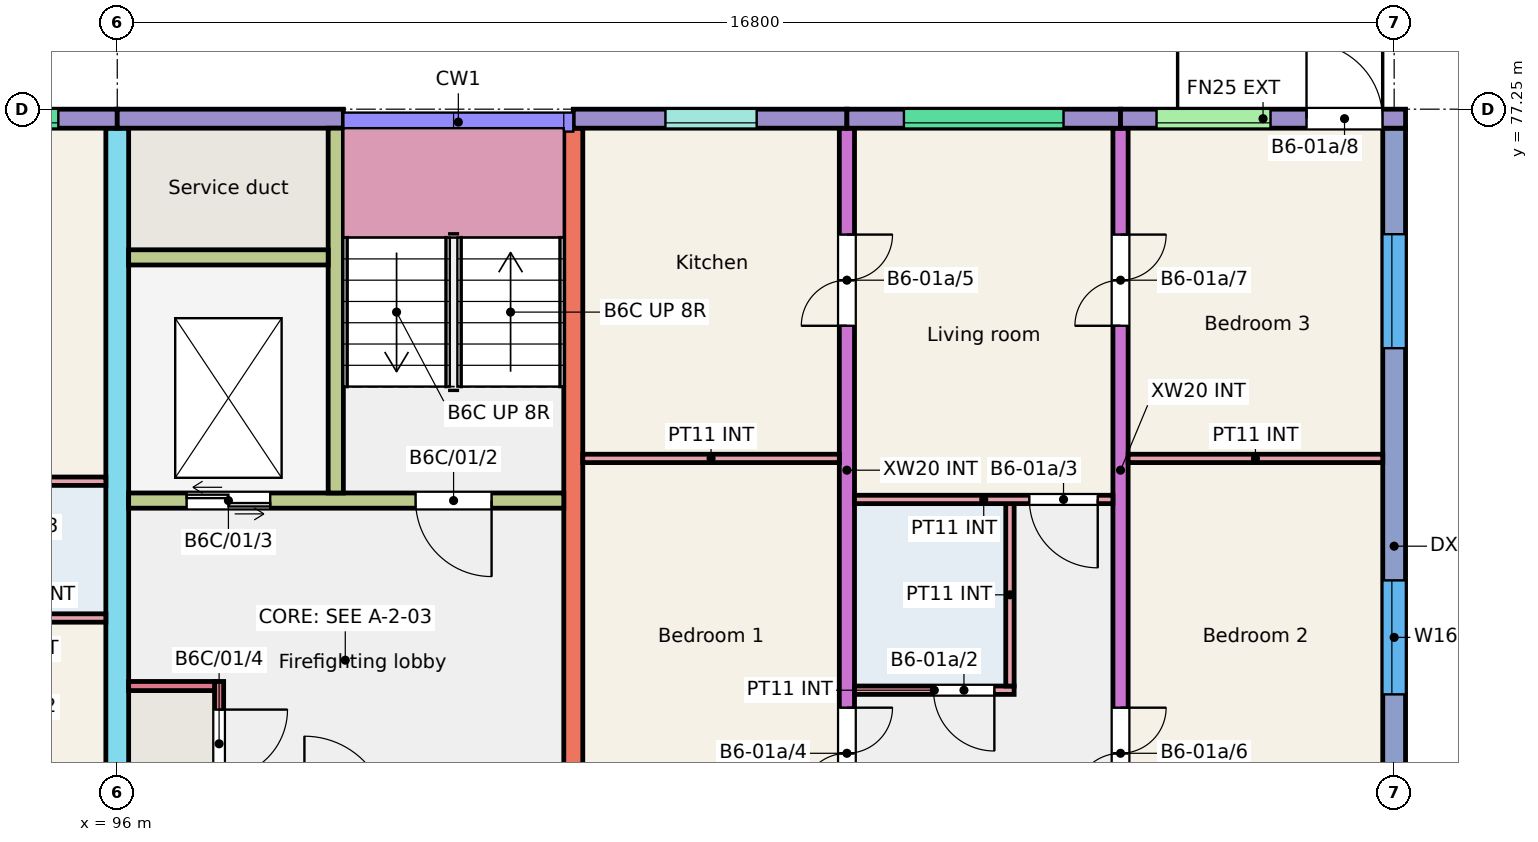
"""IFC4 building model, lengths in metres.
Left out: names, types, materials, properties, quantities, classifications, styles, units other than length and angle.
Written with IfcOpenShell. Run it as: python <this file> out.ifc"""

import sys

from ifc_helpers import new_model, si_unit, direction, frame, frame_2d, origin, place, context, subcontext, project, spatial, rectangle, extrude, element, fill, save


model = new_model("IFC4")
c1 = context("Model", 3, precision=1e-05, world=origin(), true_north=direction((0.0, 1.0)))
c2 = subcontext(c1, "Body", "Model", "MODEL_VIEW")
j1 = project(units=[si_unit("LENGTHUNIT", "METRE"), si_unit("PLANEANGLEUNIT", "RADIAN")], contexts=[c1])
p1 = place(None, origin())
s1 = spatial("IfcSite", under=j1, at=p1, CompositionType="ELEMENT")
p2 = place(p1, origin())
s2 = spatial("IfcBuilding", under=s1, at=p2, CompositionType="ELEMENT")
p3 = place(p2, frame((0.0, 0.0, 3.0)))
s3 = spatial("IfcBuildingStorey", under=s2, at=p3, CompositionType="ELEMENT", Elevation=3.0)
p4 = place(p3, frame((96.0, 66.0, 0.0), z_axis=(0.0, 0.0, 1.0), x_axis=(0.0, 1.0, 0.0)))
e1 = element("IfcWall", 1, at=p4, inside=s3, PredefinedType="SHEAR", context=c2, shape_type="SweptSolid", body=[
    extrude(rectangle(XDim=11.0, YDim=0.3, at=frame_2d((5.5, 0.0))), origin(), (0.0, 0.0, 1.0), 3.0),
])
p5 = place(p4, frame((0.3, 0.0, 0.0)))
e2 = element("IfcOpeningElement", 2, at=p5, cuts=e1, PredefinedType="OPENING", context=c2, shape_type="SweptSolid", body=[
    extrude(rectangle(XDim=1.2, YDim=2.1, at=frame_2d((0.6, 1.05))), frame((0.0, 0.16, 0.0), z_axis=(0.0, -1.0, 0.0), x_axis=(1.0, 0.0, 0.0)), (0.0, 0.0, 1.0), 0.32),
])
p6 = place(p3, frame((102.0, 68.0, 0.0), z_axis=(0.0, 0.0, 1.0), x_axis=(0.0, 1.0, 0.0)))
e3 = element("IfcWall", 3, at=p6, inside=s3, PredefinedType="SHEAR", context=c2, shape_type="SweptSolid", body=[
    extrude(rectangle(XDim=9.0, YDim=0.25, at=frame_2d((4.5, 0.0))), origin(), (0.0, 0.0, 1.0), 3.0),
])
p7 = place(p3, frame((105.6, 68.0, 0.0), z_axis=(0.0, 0.0, 1.0), x_axis=(0.0, 1.0, 0.0)))
e4 = element("IfcWall", 4, at=p7, inside=s3, PredefinedType="SHEAR", context=c2, shape_type="SweptSolid", body=[
    extrude(rectangle(XDim=9.0, YDim=0.2, at=frame_2d((4.5, 0.0))), origin(), (0.0, 0.0, 1.0), 3.0),
])
p8 = place(p7, frame((0.175, 0.0, 0.0)))
e5 = element("IfcOpeningElement", 5, at=p8, cuts=e4, PredefinedType="OPENING", context=c2, shape_type="SweptSolid", body=[
    extrude(rectangle(XDim=1.2, YDim=2.1, at=frame_2d((0.6, 1.05))), frame((0.0, 0.11, 0.0), z_axis=(0.0, -1.0, 0.0), x_axis=(1.0, 0.0, 0.0)), (0.0, 0.0, 1.0), 0.22),
])
p9 = place(p7, frame((6.4, 0.0, 0.0)))
e6 = element("IfcOpeningElement", 6, at=p9, cuts=e4, PredefinedType="OPENING", context=c2, shape_type="SweptSolid", body=[
    extrude(rectangle(XDim=1.2, YDim=2.1, at=frame_2d((0.6, 1.05))), frame((0.0, 0.11, 0.0), z_axis=(0.0, -1.0, 0.0), x_axis=(1.0, 0.0, 0.0)), (0.0, 0.0, 1.0), 0.22),
])
p10 = place(p3, frame((109.2, 68.0, 0.0), z_axis=(0.0, 0.0, 1.0), x_axis=(0.0, 1.0, 0.0)))
e7 = element("IfcWall", 7, at=p10, inside=s3, PredefinedType="SHEAR", context=c2, shape_type="SweptSolid", body=[
    extrude(rectangle(XDim=9.0, YDim=0.2, at=frame_2d((4.5, 0.0))), origin(), (0.0, 0.0, 1.0), 3.0),
])
p11 = place(p10, frame((0.175, 0.0, 0.0)))
e8 = element("IfcOpeningElement", 8, at=p11, cuts=e7, PredefinedType="OPENING", context=c2, shape_type="SweptSolid", body=[
    extrude(rectangle(XDim=1.2, YDim=2.1, at=frame_2d((0.6, 1.05))), frame((0.0, 0.11, 0.0), z_axis=(0.0, -1.0, 0.0), x_axis=(1.0, 0.0, 0.0)), (0.0, 0.0, 1.0), 0.22),
])
p12 = place(p10, frame((6.4, 0.0, 0.0)))
e9 = element("IfcOpeningElement", 9, at=p12, cuts=e7, PredefinedType="OPENING", context=c2, shape_type="SweptSolid", body=[
    extrude(rectangle(XDim=1.2, YDim=2.1, at=frame_2d((0.6, 1.05))), frame((0.0, 0.11, 0.0), z_axis=(0.0, -1.0, 0.0), x_axis=(1.0, 0.0, 0.0)), (0.0, 0.0, 1.0), 0.22),
])
p13 = place(p3, frame((112.8, 66.0, 0.0), z_axis=(0.0, 0.0, 1.0), x_axis=(0.0, 1.0, 0.0)))
e10 = element("IfcWall", 10, at=p13, inside=s3, PredefinedType="SHEAR", context=c2, shape_type="SweptSolid", body=[
    extrude(rectangle(XDim=11.0, YDim=0.3, at=frame_2d((5.5, 0.0))), origin(), (0.0, 0.0, 1.0), 3.0),
])
p14 = place(p13, frame((3.55, 0.0, 0.9)))
e11 = element("IfcOpeningElement", 11, at=p14, cuts=e10, PredefinedType="OPENING", context=c2, shape_type="SweptSolid", body=[
    extrude(rectangle(XDim=1.5, YDim=1.5, at=frame_2d((0.75, 0.75))), frame((0.0, 0.16, 0.0), z_axis=(0.0, -1.0, 0.0), x_axis=(1.0, 0.0, 0.0)), (0.0, 0.0, 1.0), 0.32),
])
p15 = place(p13, frame((8.105, 0.0, 0.9)))
e12 = element("IfcOpeningElement", 12, at=p15, cuts=e10, PredefinedType="OPENING", context=c2, shape_type="SweptSolid", body=[
    extrude(rectangle(XDim=1.5, YDim=1.5, at=frame_2d((0.75, 0.75))), frame((0.0, 0.16, 0.0), z_axis=(0.0, -1.0, 0.0), x_axis=(1.0, 0.0, 0.0)), (0.0, 0.0, 1.0), 0.32),
])
p16 = place(p3, frame((92.4, 77.125, 0.0), z_axis=(0.0, 0.0, 1.0), x_axis=(1.0, 0.0, 0.0)))
e13 = element("IfcWall", 13, at=p16, inside=s3, PredefinedType="SOLIDWALL", context=c2, shape_type="SweptSolid", body=[
    extrude(rectangle(XDim=3.6, YDim=0.25, at=frame_2d((1.8, 0.0))), origin(), (0.0, 0.0, 1.0), 3.0),
])
p17 = place(p16, frame((0.725, 0.0, 1.2)))
e14 = element("IfcOpeningElement", 14, at=p17, cuts=e13, PredefinedType="OPENING", context=c2, shape_type="SweptSolid", body=[
    extrude(rectangle(XDim=2.1, YDim=1.2, at=frame_2d((1.05, 0.6))), frame((0.0, 0.135, 0.0), z_axis=(0.0, -1.0, 0.0), x_axis=(1.0, 0.0, 0.0)), (0.0, 0.0, 1.0), 0.27),
])
p18 = place(p3, frame((96.0, 77.125, 0.0), z_axis=(0.0, 0.0, 1.0), x_axis=(1.0, 0.0, 0.0)))
e15 = element("IfcWall", 15, at=p18, inside=s3, PredefinedType="SOLIDWALL", context=c2, shape_type="SweptSolid", body=[
    extrude(rectangle(XDim=2.975, YDim=0.25, at=frame_2d((1.488, 0.0))), origin(), (0.0, 0.0, 1.0), 3.0),
])
p19 = place(p3, frame((96.15, 72.1, 0.0), z_axis=(0.0, 0.0, 1.0), x_axis=(1.0, 0.0, 0.0)))
e16 = element("IfcWall", 16, at=p19, inside=s3, PredefinedType="SHEAR", context=c2, shape_type="SweptSolid", body=[
    extrude(rectangle(XDim=5.725, YDim=0.2, at=frame_2d((2.863, 0.0))), origin(), (0.0, 0.0, 1.0), 3.0),
])
p20 = place(p19, frame((3.775, 0.0, 0.0)))
e17 = element("IfcOpeningElement", 17, at=p20, cuts=e16, PredefinedType="OPENING", context=c2, shape_type="SweptSolid", body=[
    extrude(rectangle(XDim=1.0, YDim=2.1, at=frame_2d((0.5, 1.05))), frame((0.0, 0.11, 0.0), z_axis=(0.0, -1.0, 0.0), x_axis=(1.0, 0.0, 0.0)), (0.0, 0.0, 1.0), 0.22),
])
p21 = place(p19, frame((0.762, 0.0, 0.0)))
e18 = element("IfcOpeningElement", 18, at=p21, cuts=e16, PredefinedType="OPENING", context=c2, shape_type="SweptSolid", body=[
    extrude(rectangle(XDim=1.1, YDim=2.1, at=frame_2d((0.55, 1.05))), frame((0.0, 0.11, 0.0), z_axis=(0.0, -1.0, 0.0), x_axis=(1.0, 0.0, 0.0)), (0.0, 0.0, 1.0), 0.22),
])
p22 = place(p3, frame((98.875, 72.2, 0.0), z_axis=(0.0, 0.0, 1.0), x_axis=(0.0, 1.0, 0.0)))
e19 = element("IfcWall", 19, at=p22, inside=s3, PredefinedType="SHEAR", context=c2, shape_type="SweptSolid", body=[
    extrude(rectangle(XDim=4.8, YDim=0.2, at=frame_2d((2.4, 0.0))), origin(), (0.0, 0.0, 1.0), 3.0),
])
p23 = place(p3, frame((96.15, 75.3, 0.0), z_axis=(0.0, 0.0, 1.0), x_axis=(1.0, 0.0, 0.0)))
e20 = element("IfcWall", 20, at=p23, inside=s3, PredefinedType="SHEAR", context=c2, shape_type="SweptSolid", body=[
    extrude(rectangle(XDim=2.625, YDim=0.2, at=frame_2d((1.312, 0.0))), origin(), (0.0, 0.0, 1.0), 3.0),
])
p24 = place(p3, frame((97.34, 68.0, 0.0), z_axis=(0.0, 0.0, 1.0), x_axis=(0.0, 1.0, 0.0)))
e21 = element("IfcWall", 21, at=p24, inside=s3, PredefinedType="SHEAR", context=c2, shape_type="SweptSolid", body=[
    extrude(rectangle(XDim=1.72, YDim=0.12, at=frame_2d((0.86, 0.0))), origin(), (0.0, 0.0, 1.0), 3.0),
])
p25 = place(p24, frame((0.45, 0.0, 0.0)))
e22 = element("IfcOpeningElement", 22, at=p25, cuts=e21, PredefinedType="OPENING", context=c2, shape_type="SweptSolid", body=[
    extrude(rectangle(XDim=0.9, YDim=2.1, at=frame_2d((0.45, 1.05))), frame((0.0, 0.07, 0.0), z_axis=(0.0, -1.0, 0.0), x_axis=(1.0, 0.0, 0.0)), (0.0, 0.0, 1.0), 0.14),
])
p26 = place(p3, frame((96.15, 69.66, 0.0), z_axis=(0.0, 0.0, 1.0), x_axis=(1.0, 0.0, 0.0)))
e23 = element("IfcWall", 23, at=p26, inside=s3, PredefinedType="SHEAR", context=c2, shape_type="SweptSolid", body=[
    extrude(rectangle(XDim=1.13, YDim=0.12, at=frame_2d((0.565, 0.0))), origin(), (0.0, 0.0, 1.0), 3.0),
])
p27 = place(p3, frame((102.0, 77.125, 0.0), z_axis=(0.0, 0.0, 1.0), x_axis=(1.0, 0.0, 0.0)))
e24 = element("IfcWall", 24, at=p27, inside=s3, PredefinedType="SOLIDWALL", context=c2, shape_type="SweptSolid", body=[
    extrude(rectangle(XDim=3.6, YDim=0.25, at=frame_2d((1.8, 0.0))), origin(), (0.0, 0.0, 1.0), 3.0),
])
p28 = place(p27, frame((1.212, 0.0, 1.1)))
e25 = element("IfcOpeningElement", 25, at=p28, cuts=e24, PredefinedType="OPENING", context=c2, shape_type="SweptSolid", body=[
    extrude(rectangle(XDim=1.2, YDim=1.3, at=frame_2d((0.6, 0.65))), frame((0.0, 0.135, 0.0), z_axis=(0.0, -1.0, 0.0), x_axis=(1.0, 0.0, 0.0)), (0.0, 0.0, 1.0), 0.27),
])
p29 = place(p3, frame((105.6, 77.125, 0.0), z_axis=(0.0, 0.0, 1.0), x_axis=(1.0, 0.0, 0.0)))
e26 = element("IfcWall", 26, at=p29, inside=s3, PredefinedType="SOLIDWALL", context=c2, shape_type="SweptSolid", body=[
    extrude(rectangle(XDim=3.6, YDim=0.25, at=frame_2d((1.8, 0.0))), origin(), (0.0, 0.0, 1.0), 3.0),
])
p30 = place(p29, frame((0.75, 0.0, 1.2)))
e27 = element("IfcOpeningElement", 27, at=p30, cuts=e26, PredefinedType="OPENING", context=c2, shape_type="SweptSolid", body=[
    extrude(rectangle(XDim=2.1, YDim=1.2, at=frame_2d((1.05, 0.6))), frame((0.0, 0.135, 0.0), z_axis=(0.0, -1.0, 0.0), x_axis=(1.0, 0.0, 0.0)), (0.0, 0.0, 1.0), 0.27),
])
p31 = place(p3, frame((109.2, 77.125, 0.0), z_axis=(0.0, 0.0, 1.0), x_axis=(1.0, 0.0, 0.0)))
e28 = element("IfcWall", 28, at=p31, inside=s3, PredefinedType="SOLIDWALL", context=c2, shape_type="SweptSolid", body=[
    extrude(rectangle(XDim=3.75, YDim=0.25, at=frame_2d((1.875, 0.0))), origin(), (0.0, 0.0, 1.0), 3.0),
])
p32 = place(p31, frame((0.473, 0.0, 1.2)))
e29 = element("IfcOpeningElement", 29, at=p32, cuts=e28, PredefinedType="OPENING", context=c2, shape_type="SweptSolid", body=[
    extrude(rectangle(XDim=1.5, YDim=1.2, at=frame_2d((0.75, 0.6))), frame((0.0, 0.135, 0.0), z_axis=(0.0, -1.0, 0.0), x_axis=(1.0, 0.0, 0.0)), (0.0, 0.0, 1.0), 0.27),
])
p33 = place(p31, frame((2.447, 0.0, 0.0)))
e30 = element("IfcOpeningElement", 30, at=p33, cuts=e28, PredefinedType="OPENING", context=c2, shape_type="SweptSolid", body=[
    extrude(rectangle(XDim=1.0, YDim=2.1, at=frame_2d((0.5, 1.05))), frame((0.0, 0.135, 0.0), z_axis=(0.0, -1.0, 0.0), x_axis=(1.0, 0.0, 0.0)), (0.0, 0.0, 1.0), 0.27),
])
p34 = place(p3, frame((93.91, 70.555, 0.0), z_axis=(0.0, 0.0, 1.0), x_axis=(1.0, 0.0, 0.0)))
e31 = element("IfcWall", 31, at=p34, inside=s3, PredefinedType="PARTITIONING", context=c2, shape_type="SweptSolid", body=[
    extrude(rectangle(XDim=1.94, YDim=0.11, at=frame_2d((0.97, 0.0))), origin(), (0.0, 0.0, 1.0), 2.8),
])
p35 = place(p3, frame((92.5, 72.355, 0.0), z_axis=(0.0, 0.0, 1.0), x_axis=(1.0, 0.0, 0.0)))
e32 = element("IfcWall", 32, at=p35, inside=s3, PredefinedType="PARTITIONING", context=c2, shape_type="SweptSolid", body=[
    extrude(rectangle(XDim=3.35, YDim=0.11, at=frame_2d((1.675, 0.0))), origin(), (0.0, 0.0, 1.0), 2.8),
])
p36 = place(p35, frame((0.2, 0.0, 0.0)))
e33 = element("IfcOpeningElement", 33, at=p36, cuts=e32, PredefinedType="OPENING", context=c2, shape_type="SweptSolid", body=[
    extrude(rectangle(XDim=0.9, YDim=2.1, at=frame_2d((0.45, 1.05))), frame((0.0, 0.065, 0.0), z_axis=(0.0, -1.0, 0.0), x_axis=(1.0, 0.0, 0.0)), (0.0, 0.0, 1.0), 0.13),
])
p37 = place(p3, frame((105.7, 69.605, 0.0), z_axis=(0.0, 0.0, 1.0), x_axis=(1.0, 0.0, 0.0)))
e34 = element("IfcWall", 34, at=p37, inside=s3, PredefinedType="PARTITIONING", context=c2, shape_type="SweptSolid", body=[
    extrude(rectangle(XDim=2.1, YDim=0.11, at=frame_2d((1.05, 0.0))), origin(), (0.0, 0.0, 1.0), 2.8),
])
p38 = place(p37, frame((1.04, 0.0, 0.0)))
e35 = element("IfcOpeningElement", 35, at=p38, cuts=e34, PredefinedType="OPENING", context=c2, shape_type="SweptSolid", body=[
    extrude(rectangle(XDim=0.8, YDim=2.1, at=frame_2d((0.4, 1.05))), frame((0.0, 0.065, 0.0), z_axis=(0.0, -1.0, 0.0), x_axis=(1.0, 0.0, 0.0)), (0.0, 0.0, 1.0), 0.13),
])
p39 = place(p3, frame((107.745, 69.66, 0.0), z_axis=(0.0, 0.0, 1.0), x_axis=(0.0, 1.0, 0.0)))
e36 = element("IfcWall", 36, at=p39, inside=s3, PredefinedType="PARTITIONING", context=c2, shape_type="SweptSolid", body=[
    extrude(rectangle(XDim=2.4, YDim=0.11, at=frame_2d((1.2, 0.0))), origin(), (0.0, 0.0, 1.0), 2.8),
])
p40 = place(p3, frame((105.7, 72.115, 0.0), z_axis=(0.0, 0.0, 1.0), x_axis=(1.0, 0.0, 0.0)))
e37 = element("IfcWall", 37, at=p40, inside=s3, PredefinedType="PARTITIONING", context=c2, shape_type="SweptSolid", body=[
    extrude(rectangle(XDim=3.4, YDim=0.11, at=frame_2d((1.7, 0.0))), origin(), (0.0, 0.0, 1.0), 2.8),
])
p41 = place(p40, frame((2.3, 0.0, 0.0)))
e38 = element("IfcOpeningElement", 38, at=p41, cuts=e37, PredefinedType="OPENING", context=c2, shape_type="SweptSolid", body=[
    extrude(rectangle(XDim=0.9, YDim=2.1, at=frame_2d((0.45, 1.05))), frame((0.0, 0.065, 0.0), z_axis=(0.0, -1.0, 0.0), x_axis=(1.0, 0.0, 0.0)), (0.0, 0.0, 1.0), 0.13),
])
p42 = place(p3, frame((102.125, 72.655, 0.0), z_axis=(0.0, 0.0, 1.0), x_axis=(1.0, 0.0, 0.0)))
e39 = element("IfcWall", 39, at=p42, inside=s3, PredefinedType="PARTITIONING", context=c2, shape_type="SweptSolid", body=[
    extrude(rectangle(XDim=3.375, YDim=0.11, at=frame_2d((1.688, 0.0))), origin(), (0.0, 0.0, 1.0), 2.8),
])
p43 = place(p3, frame((109.3, 72.655, 0.0), z_axis=(0.0, 0.0, 1.0), x_axis=(1.0, 0.0, 0.0)))
e40 = element("IfcWall", 40, at=p43, inside=s3, PredefinedType="PARTITIONING", context=c2, shape_type="SweptSolid", body=[
    extrude(rectangle(XDim=3.35, YDim=0.11, at=frame_2d((1.675, 0.0))), origin(), (0.0, 0.0, 1.0), 2.8),
])
p44 = place(p17, origin())
e41 = element("IfcWindow", 41, at=p44, inside=s3, PartitioningType="SINGLE_PANEL", PredefinedType="WINDOW", context=c2, shape_type="SweptSolid", body=[
    extrude(rectangle(XDim=2.1, YDim=1.2, at=frame_2d((1.05, 0.6))), frame((0.0, -0.025, 0.0), z_axis=(0.0, -1.0, 0.0), x_axis=(1.0, 0.0, 0.0)), (0.0, 0.0, 1.0), 0.06),
])
fill(e14, e41)
p45 = place(p28, origin())
e42 = element("IfcWindow", 42, at=p45, inside=s3, PartitioningType="SINGLE_PANEL", PredefinedType="WINDOW", context=c2, shape_type="SweptSolid", body=[
    extrude(rectangle(XDim=1.2, YDim=1.3, at=frame_2d((0.6, 0.65))), frame((0.0, -0.025, 0.0), z_axis=(0.0, -1.0, 0.0), x_axis=(1.0, 0.0, 0.0)), (0.0, 0.0, 1.0), 0.06),
])
fill(e25, e42)
p46 = place(p32, origin())
e43 = element("IfcWindow", 43, at=p46, inside=s3, PartitioningType="SINGLE_PANEL", PredefinedType="WINDOW", context=c2, shape_type="SweptSolid", body=[
    extrude(rectangle(XDim=1.5, YDim=1.2, at=frame_2d((0.75, 0.6))), frame((0.0, -0.025, 0.0), z_axis=(0.0, -1.0, 0.0), x_axis=(1.0, 0.0, 0.0)), (0.0, 0.0, 1.0), 0.06),
])
fill(e29, e43)
p47 = place(p30, origin())
e44 = element("IfcWindow", 44, at=p47, inside=s3, PartitioningType="SINGLE_PANEL", PredefinedType="WINDOW", context=c2, shape_type="SweptSolid", body=[
    extrude(rectangle(XDim=2.1, YDim=1.2, at=frame_2d((1.05, 0.6))), frame((0.0, -0.025, 0.0), z_axis=(0.0, -1.0, 0.0), x_axis=(1.0, 0.0, 0.0)), (0.0, 0.0, 1.0), 0.06),
])
fill(e27, e44)
p48 = place(p14, origin())
e45 = element("IfcWindow", 45, at=p48, inside=s3, PartitioningType="SINGLE_PANEL", PredefinedType="WINDOW", context=c2, shape_type="SweptSolid", body=[
    extrude(rectangle(XDim=1.5, YDim=1.5, at=frame_2d((0.75, 0.75))), frame((0.0, 0.06, 0.0), z_axis=(0.0, -1.0, 0.0), x_axis=(1.0, 0.0, 0.0)), (0.0, 0.0, 1.0), 0.06),
])
fill(e11, e45)
p49 = place(p15, origin())
e46 = element("IfcWindow", 46, at=p49, inside=s3, PartitioningType="SINGLE_PANEL", PredefinedType="WINDOW", context=c2, shape_type="SweptSolid", body=[
    extrude(rectangle(XDim=1.5, YDim=1.5, at=frame_2d((0.75, 0.75))), frame((0.0, 0.06, 0.0), z_axis=(0.0, -1.0, 0.0), x_axis=(1.0, 0.0, 0.0)), (0.0, 0.0, 1.0), 0.06),
])
fill(e12, e46)
p50 = place(p38, origin())
e47 = element("IfcDoor", 47, at=p50, inside=s3, OperationType="SINGLE_SWING_RIGHT", PredefinedType="DOOR", context=c2, shape_type="SweptSolid", body=[
    extrude(rectangle(XDim=0.8, YDim=2.1, at=frame_2d((0.4, 1.05))), frame((0.0, 0.025, 0.0), z_axis=(0.0, -1.0, 0.0), x_axis=(1.0, 0.0, 0.0)), (0.0, 0.0, 1.0), 0.05),
])
fill(e35, e47)
p51 = place(p41, origin())
e48 = element("IfcDoor", 48, at=p51, inside=s3, OperationType="SINGLE_SWING_RIGHT", PredefinedType="DOOR", context=c2, shape_type="SweptSolid", body=[
    extrude(rectangle(XDim=0.9, YDim=2.1, at=frame_2d((0.45, 1.05))), frame((0.0, 0.025, 0.0), z_axis=(0.0, -1.0, 0.0), x_axis=(1.0, 0.0, 0.0)), (0.0, 0.0, 1.0), 0.05),
])
fill(e38, e48)
p52 = place(p8, origin())
e49 = element("IfcDoor", 49, at=p52, inside=s3, OperationType="DOUBLE_DOOR_SINGLE_SWING", PredefinedType="DOOR", context=c2, shape_type="SweptSolid", body=[
    extrude(rectangle(XDim=1.2, YDim=2.1, at=frame_2d((0.6, 1.05))), frame((0.0, 0.025, 0.0), z_axis=(0.0, -1.0, 0.0), x_axis=(1.0, 0.0, 0.0)), (0.0, 0.0, 1.0), 0.05),
])
fill(e5, e49)
p53 = place(p9, origin())
e50 = element("IfcDoor", 50, at=p53, inside=s3, OperationType="DOUBLE_DOOR_SINGLE_SWING", PredefinedType="DOOR", context=c2, shape_type="SweptSolid", body=[
    extrude(rectangle(XDim=1.2, YDim=2.1, at=frame_2d((0.6, 1.05))), frame((0.0, 0.025, 0.0), z_axis=(0.0, -1.0, 0.0), x_axis=(1.0, 0.0, 0.0)), (0.0, 0.0, 1.0), 0.05),
])
fill(e6, e50)
p54 = place(p11, origin())
e51 = element("IfcDoor", 51, at=p54, inside=s3, OperationType="DOUBLE_DOOR_SINGLE_SWING", PredefinedType="DOOR", context=c2, shape_type="SweptSolid", body=[
    extrude(rectangle(XDim=1.2, YDim=2.1, at=frame_2d((0.6, 1.05))), frame((0.0, 0.025, 0.0), z_axis=(0.0, -1.0, 0.0), x_axis=(1.0, 0.0, 0.0)), (0.0, 0.0, 1.0), 0.05),
])
fill(e8, e51)
p55 = place(p12, origin())
e52 = element("IfcDoor", 52, at=p55, inside=s3, OperationType="DOUBLE_DOOR_SINGLE_SWING", PredefinedType="DOOR", context=c2, shape_type="SweptSolid", body=[
    extrude(rectangle(XDim=1.2, YDim=2.1, at=frame_2d((0.6, 1.05))), frame((0.0, 0.025, 0.0), z_axis=(0.0, -1.0, 0.0), x_axis=(1.0, 0.0, 0.0)), (0.0, 0.0, 1.0), 0.05),
])
fill(e9, e52)
p56 = place(p33, origin())
e53 = element("IfcDoor", 53, at=p56, inside=s3, OperationType="SINGLE_SWING_LEFT", PredefinedType="DOOR", context=c2, shape_type="SweptSolid", body=[
    extrude(rectangle(XDim=1.0, YDim=2.1, at=frame_2d((0.5, 1.05))), frame((0.0, 0.025, 0.0), z_axis=(0.0, -1.0, 0.0), x_axis=(1.0, 0.0, 0.0)), (0.0, 0.0, 1.0), 0.05),
])
fill(e30, e53)
p57 = place(p20, origin())
e54 = element("IfcDoor", 54, at=p57, inside=s3, OperationType="SINGLE_SWING_RIGHT", PredefinedType="DOOR", context=c2, shape_type="SweptSolid", body=[
    extrude(rectangle(XDim=1.0, YDim=2.1, at=frame_2d((0.5, 1.05))), frame((0.0, 0.025, 0.0), z_axis=(0.0, -1.0, 0.0), x_axis=(1.0, 0.0, 0.0)), (0.0, 0.0, 1.0), 0.05),
])
fill(e17, e54)
p58 = place(p21, origin())
e55 = element("IfcDoor", 55, at=p58, inside=s3, OperationType="DOUBLE_DOOR_SLIDING", PredefinedType="DOOR", context=c2, shape_type="SweptSolid", body=[
    extrude(rectangle(XDim=1.1, YDim=2.1, at=frame_2d((0.55, 1.05))), frame((0.0, 0.025, 0.0), z_axis=(0.0, -1.0, 0.0), x_axis=(1.0, 0.0, 0.0)), (0.0, 0.0, 1.0), 0.05),
])
fill(e18, e55)
p59 = place(p25, origin())
e56 = element("IfcDoor", 56, at=p59, inside=s3, OperationType="SINGLE_SWING_RIGHT", PredefinedType="DOOR", context=c2, shape_type="SweptSolid", body=[
    extrude(rectangle(XDim=0.9, YDim=2.1, at=frame_2d((0.45, 1.05))), frame((0.0, 0.025, 0.0), z_axis=(0.0, -1.0, 0.0), x_axis=(1.0, 0.0, 0.0)), (0.0, 0.0, 1.0), 0.05),
])
fill(e22, e56)
save(model, sys.argv[1])
